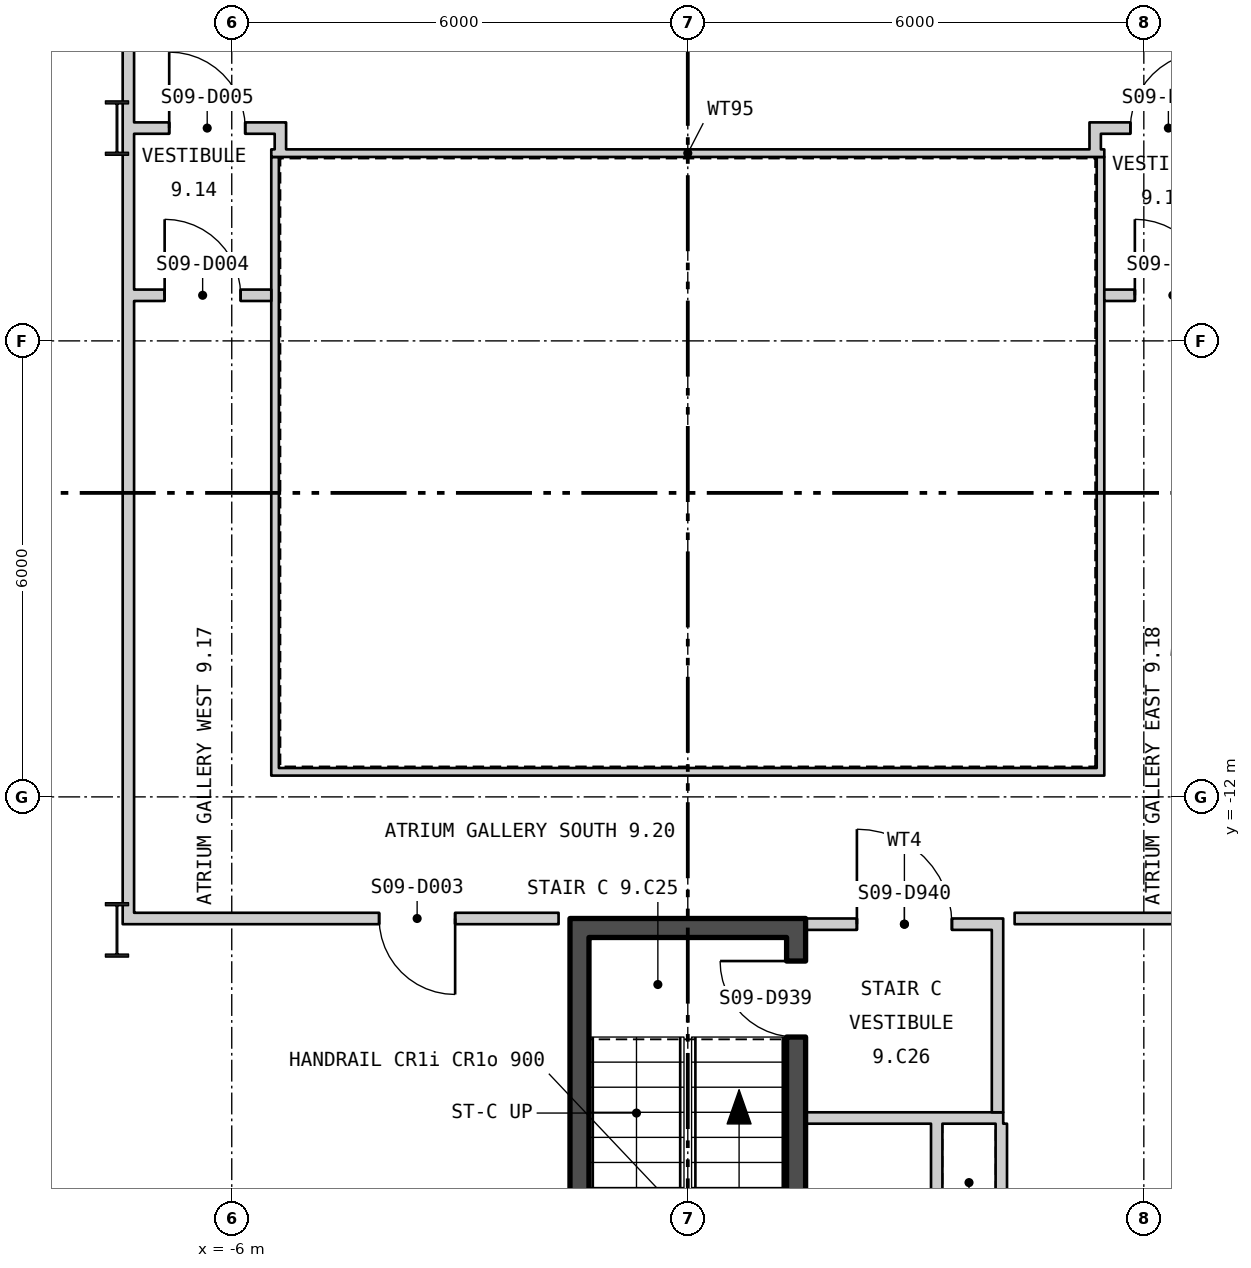
"""IFC4 building model, lengths in metres.
Left out: names, types, materials, properties, quantities, classifications, styles, units other than length and angle.
Written with IfcOpenShell. Run it as: python <this file> out.ifc"""

import sys

from ifc_helpers import new_model, si_unit, direction, frame, frame_2d, origin, origin_2d, place, context, subcontext, project, spatial, polyline, rectangle, i_section, outline, extrude, element, fill, save


model = new_model("IFC4")
c1 = context("Model", 3, precision=1e-05, world=origin(), true_north=direction((0.0, 1.0)))
c2 = subcontext(c1, "Body", "Model", "MODEL_VIEW")
j1 = project(units=[si_unit("LENGTHUNIT", "METRE"), si_unit("PLANEANGLEUNIT", "RADIAN")], contexts=[c1])
p1 = place(None, origin())
s1 = spatial("IfcSite", under=j1, at=p1, CompositionType="ELEMENT")
p2 = place(p1, origin())
s2 = spatial("IfcBuilding", under=s1, at=p2, CompositionType="ELEMENT")
p3 = place(p2, frame((0.0, 0.0, 124.8)))
s3 = spatial("IfcBuildingStorey", under=s2, at=p3, CompositionType="ELEMENT", Elevation=124.8)
for number, where, z_axis, x_axis in (
    (1, (-7.51, -3.2, 0.0), (0.0, 0.0, 1.0), (1.0, 0.0, 0.0)),
    (2, (-7.51, -13.75, 0.0), (0.0, 0.0, 1.0), (1.0, 0.0, 0.0)),
):
    element("IfcColumn", number, at=place(p3, frame(where, z_axis=z_axis, x_axis=x_axis)), inside=s3, PredefinedType="COLUMN", context=c2, shape_type="SweptSolid", body=[
        extrude(i_section(OverallWidth=0.304, OverallDepth=0.716, WebThickness=0.021, FlangeThickness=0.04, at=origin_2d()), origin(), (0.0, 0.0, 1.0), 4.5),
    ])
p4 = place(p3, frame((-27.45, 12.042, -0.18), z_axis=(0.0, 0.0, 1.0), x_axis=(0.500000711659, -0.866024992908, 0.0)))
e3 = element("IfcWall", 3, at=p4, inside=s3, PredefinedType="SOLIDWALL", context=c2, shape_type="SweptSolid", body=[
    extrude(outline(polyline([(-0.13, -0.225), (45.87, -0.225), (45.61, 0.225), (0.13, 0.225), (-0.13, -0.225)])), origin(), (0.0, 0.0, 1.0), 4.28),
])
p5 = place(p4, frame((1.424, 0.0, 1.08)))
e4 = element("IfcOpeningElement", 4, at=p5, cuts=e3, PredefinedType="OPENING", context=c2, shape_type="SweptSolid", body=[
    extrude(rectangle(XDim=2.4, YDim=2.6, at=frame_2d((1.2, 1.3))), frame((0.0, 0.235, 0.0), z_axis=(0.0, -1.0, 0.0), x_axis=(1.0, 0.0, 0.0)), (0.0, 0.0, 1.0), 0.47),
])
p6 = place(p4, frame((5.893, 0.0, 1.08)))
e5 = element("IfcOpeningElement", 5, at=p6, cuts=e3, PredefinedType="OPENING", context=c2, shape_type="SweptSolid", body=[
    extrude(rectangle(XDim=2.4, YDim=2.6, at=frame_2d((1.2, 1.3))), frame((0.0, 0.235, 0.0), z_axis=(0.0, -1.0, 0.0), x_axis=(1.0, 0.0, 0.0)), (0.0, 0.0, 1.0), 0.47),
])
p7 = place(p4, frame((10.401, 0.0, 1.08)))
e6 = element("IfcOpeningElement", 6, at=p7, cuts=e3, PredefinedType="OPENING", context=c2, shape_type="SweptSolid", body=[
    extrude(rectangle(XDim=2.4, YDim=2.6, at=frame_2d((1.2, 1.3))), frame((0.0, 0.235, 0.0), z_axis=(0.0, -1.0, 0.0), x_axis=(1.0, 0.0, 0.0)), (0.0, 0.0, 1.0), 0.47),
])
p8 = place(p4, frame((19.416, 0.0, 1.08)))
e7 = element("IfcOpeningElement", 7, at=p8, cuts=e3, PredefinedType="OPENING", context=c2, shape_type="SweptSolid", body=[
    extrude(rectangle(XDim=2.4, YDim=2.6, at=frame_2d((1.2, 1.3))), frame((0.0, 0.235, 0.0), z_axis=(0.0, -1.0, 0.0), x_axis=(1.0, 0.0, 0.0)), (0.0, 0.0, 1.0), 0.47),
])
p9 = place(p4, frame((23.924, 0.0, 1.08)))
e8 = element("IfcOpeningElement", 8, at=p9, cuts=e3, PredefinedType="OPENING", context=c2, shape_type="SweptSolid", body=[
    extrude(rectangle(XDim=2.4, YDim=2.6, at=frame_2d((1.2, 1.3))), frame((0.0, 0.235, 0.0), z_axis=(0.0, -1.0, 0.0), x_axis=(1.0, 0.0, 0.0)), (0.0, 0.0, 1.0), 0.47),
])
p10 = place(p4, frame((28.431, 0.0, 1.08)))
e9 = element("IfcOpeningElement", 9, at=p10, cuts=e3, PredefinedType="OPENING", context=c2, shape_type="SweptSolid", body=[
    extrude(rectangle(XDim=2.4, YDim=2.6, at=frame_2d((1.2, 1.3))), frame((0.0, 0.235, 0.0), z_axis=(0.0, -1.0, 0.0), x_axis=(1.0, 0.0, 0.0)), (0.0, 0.0, 1.0), 0.47),
])
p11 = place(p4, frame((32.939, 0.0, 1.08)))
e10 = element("IfcOpeningElement", 10, at=p11, cuts=e3, PredefinedType="OPENING", context=c2, shape_type="SweptSolid", body=[
    extrude(rectangle(XDim=2.4, YDim=2.6, at=frame_2d((1.2, 1.3))), frame((0.0, 0.235, 0.0), z_axis=(0.0, -1.0, 0.0), x_axis=(1.0, 0.0, 0.0)), (0.0, 0.0, 1.0), 0.47),
])
p12 = place(p4, frame((37.447, 0.0, 1.08)))
e11 = element("IfcOpeningElement", 11, at=p12, cuts=e3, PredefinedType="OPENING", context=c2, shape_type="SweptSolid", body=[
    extrude(rectangle(XDim=2.4, YDim=2.6, at=frame_2d((1.2, 1.3))), frame((0.0, 0.235, 0.0), z_axis=(0.0, -1.0, 0.0), x_axis=(1.0, 0.0, 0.0)), (0.0, 0.0, 1.0), 0.47),
])
p13 = place(p4, frame((41.916, 0.0, 1.08)))
e12 = element("IfcOpeningElement", 12, at=p13, cuts=e3, PredefinedType="OPENING", context=c2, shape_type="SweptSolid", body=[
    extrude(rectangle(XDim=2.4, YDim=2.6, at=frame_2d((1.2, 1.3))), frame((0.0, 0.235, 0.0), z_axis=(0.0, -1.0, 0.0), x_axis=(1.0, 0.0, 0.0)), (0.0, 0.0, 1.0), 0.47),
])
p14 = place(p3, frame((4.58, -27.57, -0.18), z_axis=(0.0, 0.0, 1.0), x_axis=(0.500000711659, 0.866024992908, 0.0)))
e13 = element("IfcWall", 13, at=p14, inside=s3, PredefinedType="SOLIDWALL", context=c2, shape_type="SweptSolid", body=[
    extrude(outline(polyline([(-0.13, -0.225), (45.87, -0.225), (45.61, 0.225), (0.13, 0.225), (-0.13, -0.225)])), origin(), (0.0, 0.0, 1.0), 4.28),
])
p15 = place(p14, frame((1.424, 0.0, 1.08)))
e14 = element("IfcOpeningElement", 14, at=p15, cuts=e13, PredefinedType="OPENING", context=c2, shape_type="SweptSolid", body=[
    extrude(rectangle(XDim=2.4, YDim=2.6, at=frame_2d((1.2, 1.3))), frame((0.0, 0.235, 0.0), z_axis=(0.0, -1.0, 0.0), x_axis=(1.0, 0.0, 0.0)), (0.0, 0.0, 1.0), 0.47),
])
p16 = place(p14, frame((5.893, 0.0, 1.08)))
e15 = element("IfcOpeningElement", 15, at=p16, cuts=e13, PredefinedType="OPENING", context=c2, shape_type="SweptSolid", body=[
    extrude(rectangle(XDim=2.4, YDim=2.6, at=frame_2d((1.2, 1.3))), frame((0.0, 0.235, 0.0), z_axis=(0.0, -1.0, 0.0), x_axis=(1.0, 0.0, 0.0)), (0.0, 0.0, 1.0), 0.47),
])
p17 = place(p14, frame((10.401, 0.0, 1.08)))
e16 = element("IfcOpeningElement", 16, at=p17, cuts=e13, PredefinedType="OPENING", context=c2, shape_type="SweptSolid", body=[
    extrude(rectangle(XDim=2.4, YDim=2.6, at=frame_2d((1.2, 1.3))), frame((0.0, 0.235, 0.0), z_axis=(0.0, -1.0, 0.0), x_axis=(1.0, 0.0, 0.0)), (0.0, 0.0, 1.0), 0.47),
])
p18 = place(p14, frame((14.909, 0.0, 1.08)))
e17 = element("IfcOpeningElement", 17, at=p18, cuts=e13, PredefinedType="OPENING", context=c2, shape_type="SweptSolid", body=[
    extrude(rectangle(XDim=2.4, YDim=2.6, at=frame_2d((1.2, 1.3))), frame((0.0, 0.235, 0.0), z_axis=(0.0, -1.0, 0.0), x_axis=(1.0, 0.0, 0.0)), (0.0, 0.0, 1.0), 0.47),
])
p19 = place(p14, frame((19.416, 0.0, 1.08)))
e18 = element("IfcOpeningElement", 18, at=p19, cuts=e13, PredefinedType="OPENING", context=c2, shape_type="SweptSolid", body=[
    extrude(rectangle(XDim=2.4, YDim=2.6, at=frame_2d((1.2, 1.3))), frame((0.0, 0.235, 0.0), z_axis=(0.0, -1.0, 0.0), x_axis=(1.0, 0.0, 0.0)), (0.0, 0.0, 1.0), 0.47),
])
p20 = place(p14, frame((23.924, 0.0, 1.08)))
e19 = element("IfcOpeningElement", 19, at=p20, cuts=e13, PredefinedType="OPENING", context=c2, shape_type="SweptSolid", body=[
    extrude(rectangle(XDim=2.4, YDim=2.6, at=frame_2d((1.2, 1.3))), frame((0.0, 0.235, 0.0), z_axis=(0.0, -1.0, 0.0), x_axis=(1.0, 0.0, 0.0)), (0.0, 0.0, 1.0), 0.47),
])
p21 = place(p14, frame((32.939, 0.0, 1.08)))
e20 = element("IfcOpeningElement", 20, at=p21, cuts=e13, PredefinedType="OPENING", context=c2, shape_type="SweptSolid", body=[
    extrude(rectangle(XDim=2.4, YDim=2.6, at=frame_2d((1.2, 1.3))), frame((0.0, 0.235, 0.0), z_axis=(0.0, -1.0, 0.0), x_axis=(1.0, 0.0, 0.0)), (0.0, 0.0, 1.0), 0.47),
])
p22 = place(p14, frame((37.447, 0.0, 1.08)))
e21 = element("IfcOpeningElement", 21, at=p22, cuts=e13, PredefinedType="OPENING", context=c2, shape_type="SweptSolid", body=[
    extrude(rectangle(XDim=2.4, YDim=2.6, at=frame_2d((1.2, 1.3))), frame((0.0, 0.235, 0.0), z_axis=(0.0, -1.0, 0.0), x_axis=(1.0, 0.0, 0.0)), (0.0, 0.0, 1.0), 0.47),
])
p23 = place(p14, frame((41.916, 0.0, 1.08)))
e22 = element("IfcOpeningElement", 22, at=p23, cuts=e13, PredefinedType="OPENING", context=c2, shape_type="SweptSolid", body=[
    extrude(rectangle(XDim=2.4, YDim=2.6, at=frame_2d((1.2, 1.3))), frame((0.0, 0.235, 0.0), z_axis=(0.0, -1.0, 0.0), x_axis=(1.0, 0.0, 0.0)), (0.0, 0.0, 1.0), 0.47),
])
p24 = place(p3, frame((-5.48, -11.67, 0.0), z_axis=(0.0, 0.0, 1.0), x_axis=(1.0, 0.0, 0.0)))
e23 = element("IfcWall", 23, at=p24, inside=s3, PredefinedType="PARTITIONING", context=c2, shape_type="SweptSolid", body=[
    extrude(rectangle(XDim=10.96, YDim=0.1, at=frame_2d((5.48, 0.0))), origin(), (0.0, 0.0, 1.0), 4.3),
])
p25 = place(p3, frame((5.43, -11.62, 0.0), z_axis=(0.0, 0.0, 1.0), x_axis=(0.0, 1.0, 0.0)))
e24 = element("IfcWall", 24, at=p25, inside=s3, PredefinedType="PARTITIONING", context=c2, shape_type="SweptSolid", body=[
    extrude(rectangle(XDim=8.04, YDim=0.1, at=frame_2d((4.02, 0.0))), origin(), (0.0, 0.0, 1.0), 4.3),
])
p26 = place(p3, frame((5.48, -3.53, 0.0), z_axis=(0.0, 0.0, 1.0), x_axis=(-1.0, 0.0, 0.0)))
e25 = element("IfcWall", 25, at=p26, inside=s3, PredefinedType="PARTITIONING", context=c2, shape_type="SweptSolid", body=[
    extrude(rectangle(XDim=10.96, YDim=0.1, at=frame_2d((5.48, 0.0))), origin(), (0.0, 0.0, 1.0), 4.3),
])
p27 = place(p3, frame((-5.43, -3.58, 0.0), z_axis=(0.0, 0.0, 1.0), x_axis=(0.0, -1.0, 0.0)))
e26 = element("IfcWall", 26, at=p27, inside=s3, PredefinedType="PARTITIONING", context=c2, shape_type="SweptSolid", body=[
    extrude(rectangle(XDim=8.04, YDim=0.1, at=frame_2d((4.02, 0.0))), origin(), (0.0, 0.0, 1.0), 4.3),
])
p28 = place(p3, frame((-1.425, -21.05, 0.0), z_axis=(0.0, 0.0, 1.0), x_axis=(0.0, 1.0, 0.0)))
e27 = element("IfcWall", 27, at=p28, inside=s3, PredefinedType="SHEAR", context=c2, shape_type="SweptSolid", body=[
    extrude(rectangle(XDim=7.2, YDim=0.25, at=frame_2d((3.6, 0.0))), origin(), (0.0, 0.0, 1.0), 4.3),
])
p29 = place(p3, frame((1.425, -21.05, 0.0), z_axis=(0.0, 0.0, 1.0), x_axis=(0.0, 1.0, 0.0)))
e28 = element("IfcWall", 28, at=p29, inside=s3, PredefinedType="SHEAR", context=c2, shape_type="SweptSolid", body=[
    extrude(rectangle(XDim=7.2, YDim=0.25, at=frame_2d((3.6, 0.0))), origin(), (0.0, 0.0, 1.0), 4.3),
])
p30 = place(p29, frame((5.89, 0.0, 0.0)))
e29 = element("IfcOpeningElement", 29, at=p30, cuts=e28, PredefinedType="OPENING", context=c2, shape_type="SweptSolid", body=[
    extrude(rectangle(XDim=1.0, YDim=2.1, at=frame_2d((0.5, 1.05))), frame((0.0, 0.135, 0.0), z_axis=(0.0, -1.0, 0.0), x_axis=(1.0, 0.0, 0.0)), (0.0, 0.0, 1.0), 0.27),
])
p31 = place(p3, frame((-1.55, -13.725, 0.0), z_axis=(0.0, 0.0, 1.0), x_axis=(1.0, 0.0, 0.0)))
e30 = element("IfcWall", 30, at=p31, inside=s3, PredefinedType="SHEAR", context=c2, shape_type="SweptSolid", body=[
    extrude(rectangle(XDim=3.1, YDim=0.25, at=frame_2d((1.55, 0.0))), origin(), (0.0, 0.0, 1.0), 4.3),
])
p32 = place(p3, frame((1.55, -16.225, 0.0), z_axis=(0.0, 0.0, 1.0), x_axis=(1.0, 0.0, 0.0)))
e31 = element("IfcWall", 31, at=p32, inside=s3, PredefinedType="PARTITIONING", context=c2, shape_type="SweptSolid", body=[
    extrude(rectangle(XDim=2.6, YDim=0.15, at=frame_2d((1.3, 0.0))), origin(), (0.0, 0.0, 1.0), 4.3),
])
p33 = place(p3, frame((4.075, -16.15, 0.0), z_axis=(0.0, 0.0, 1.0), x_axis=(0.0, 1.0, 0.0)))
e32 = element("IfcWall", 32, at=p33, inside=s3, PredefinedType="PARTITIONING", context=c2, shape_type="SweptSolid", body=[
    extrude(rectangle(XDim=2.4, YDim=0.15, at=frame_2d((1.2, 0.0))), origin(), (0.0, 0.0, 1.0), 4.3),
])
p34 = place(p3, frame((1.55, -13.675, 0.0), z_axis=(0.0, 0.0, 1.0), x_axis=(1.0, 0.0, 0.0)))
e33 = element("IfcWall", 33, at=p34, inside=s3, PredefinedType="PARTITIONING", context=c2, shape_type="SweptSolid", body=[
    extrude(rectangle(XDim=2.6, YDim=0.15, at=frame_2d((1.3, 0.0))), origin(), (0.0, 0.0, 1.0), 3.39),
])
p35 = place(p34, frame((0.675, 0.0, 0.0)))
e34 = element("IfcOpeningElement", 34, at=p35, cuts=e33, PredefinedType="OPENING", context=c2, shape_type="SweptSolid", body=[
    extrude(rectangle(XDim=1.25, YDim=2.1, at=frame_2d((0.625, 1.05))), frame((0.0, 0.085, 0.0), z_axis=(0.0, -1.0, 0.0), x_axis=(1.0, 0.0, 0.0)), (0.0, 0.0, 1.0), 0.17),
])
p36 = place(p3, frame((3.275, -18.0, 0.0), z_axis=(0.0, 0.0, 1.0), x_axis=(0.0, 1.0, 0.0)))
e35 = element("IfcWall", 35, at=p36, inside=s3, PredefinedType="PARTITIONING", context=c2, shape_type="SweptSolid", body=[
    extrude(rectangle(XDim=1.7, YDim=0.15, at=frame_2d((0.85, 0.0))), origin(), (0.0, 0.0, 1.0), 3.61),
])
p37 = place(p3, frame((4.125, -18.0, 0.0), z_axis=(0.0, 0.0, 1.0), x_axis=(0.0, 1.0, 0.0)))
e36 = element("IfcWall", 36, at=p37, inside=s3, PredefinedType="PARTITIONING", context=c2, shape_type="SweptSolid", body=[
    extrude(rectangle(XDim=1.7, YDim=0.15, at=frame_2d((0.85, 0.0))), origin(), (0.0, 0.0, 1.0), 4.3),
])
p38 = place(p3, frame((-7.36, -13.675, 0.0), z_axis=(0.0, 0.0, 1.0), x_axis=(0.0, 1.0, 0.0)))
e37 = element("IfcWall", 37, at=p38, inside=s3, PredefinedType="PARTITIONING", context=c2, shape_type="SweptSolid", body=[
    extrude(rectangle(XDim=10.167, YDim=0.15, at=frame_2d((5.083, 0.0))), origin(), (0.0, 0.0, 1.0), 3.7),
])
p39 = place(p3, frame((-7.36, -3.508, 0.0), z_axis=(0.0, 0.0, 1.0), x_axis=(0.0, 1.0, 0.0)))
e38 = element("IfcWall", 38, at=p39, inside=s3, PredefinedType="PARTITIONING", context=c2, shape_type="SweptSolid", body=[
    extrude(rectangle(XDim=1.633, YDim=0.15, at=frame_2d((0.817, 0.0))), origin(), (0.0, 0.0, 1.0), 4.3),
])
p40 = place(p3, frame((-7.285, -13.6, 0.0), z_axis=(0.0, 0.0, 1.0), x_axis=(1.0, 0.0, 0.0)))
e39 = element("IfcWall", 39, at=p40, inside=s3, PredefinedType="PARTITIONING", context=c2, shape_type="SweptSolid", body=[
    extrude(rectangle(XDim=5.585, YDim=0.15, at=frame_2d((2.792, 0.0))), origin(), (0.0, 0.0, 1.0), 3.39),
])
p41 = place(p40, frame((3.224, 0.0, 0.0)))
e40 = element("IfcOpeningElement", 40, at=p41, cuts=e39, PredefinedType="OPENING", context=c2, shape_type="SweptSolid", body=[
    extrude(rectangle(XDim=1.0, YDim=2.1, at=frame_2d((0.5, 1.05))), frame((0.0, 0.085, 0.0), z_axis=(0.0, -1.0, 0.0), x_axis=(1.0, 0.0, 0.0)), (0.0, 0.0, 1.0), 0.17),
])
p42 = place(p3, frame((-7.285, -5.4, 0.0), z_axis=(0.0, 0.0, 1.0), x_axis=(1.0, 0.0, 0.0)))
e41 = element("IfcWall", 41, at=p42, inside=s3, PredefinedType="PARTITIONING", context=c2, shape_type="SweptSolid", body=[
    extrude(rectangle(XDim=1.805, YDim=0.15, at=frame_2d((0.902, 0.0))), origin(), (0.0, 0.0, 1.0), 4.3),
])
p43 = place(p42, frame((0.402, 0.0, 0.0)))
e42 = element("IfcOpeningElement", 42, at=p43, cuts=e41, PredefinedType="OPENING", context=c2, shape_type="SweptSolid", body=[
    extrude(rectangle(XDim=1.0, YDim=2.1, at=frame_2d((0.5, 1.05))), frame((0.0, 0.085, 0.0), z_axis=(0.0, -1.0, 0.0), x_axis=(1.0, 0.0, 0.0)), (0.0, 0.0, 1.0), 0.17),
])
p44 = place(p3, frame((-7.285, -3.2, 0.0), z_axis=(0.0, 0.0, 1.0), x_axis=(1.0, 0.0, 0.0)))
e43 = element("IfcWall", 43, at=p44, inside=s3, PredefinedType="PARTITIONING", context=c2, shape_type="SweptSolid", body=[
    extrude(rectangle(XDim=2.0, YDim=0.15, at=frame_2d((1.0, 0.0))), origin(), (0.0, 0.0, 1.0), 3.39),
])
p45 = place(p44, frame((0.462, 0.0, 0.0)))
e44 = element("IfcOpeningElement", 44, at=p45, cuts=e43, PredefinedType="OPENING", context=c2, shape_type="SweptSolid", body=[
    extrude(rectangle(XDim=1.0, YDim=2.1, at=frame_2d((0.5, 1.05))), frame((0.0, 0.085, 0.0), z_axis=(0.0, -1.0, 0.0), x_axis=(1.0, 0.0, 0.0)), (0.0, 0.0, 1.0), 0.17),
])
p46 = place(p3, frame((-5.36, -3.48, 0.0), z_axis=(0.0, 0.0, 1.0), x_axis=(0.0, 1.0, 0.0)))
e45 = element("IfcWall", 45, at=p46, inside=s3, PredefinedType="PARTITIONING", context=c2, shape_type="SweptSolid", body=[
    extrude(rectangle(XDim=0.205, YDim=0.15, at=frame_2d((0.102, 0.0))), origin(), (0.0, 0.0, 1.0), 4.3),
])
p47 = place(p3, frame((4.3, -13.6, 0.0), z_axis=(0.0, 0.0, 1.0), x_axis=(1.0, 0.0, 0.0)))
e46 = element("IfcWall", 46, at=p47, inside=s3, PredefinedType="PARTITIONING", context=c2, shape_type="SweptSolid", body=[
    extrude(rectangle(XDim=2.985, YDim=0.15, at=frame_2d((1.492, 0.0))), origin(), (0.0, 0.0, 1.0), 3.39),
])
p48 = place(p3, frame((5.285, -3.2, 0.0), z_axis=(0.0, 0.0, 1.0), x_axis=(1.0, 0.0, 0.0)))
e47 = element("IfcWall", 47, at=p48, inside=s3, PredefinedType="PARTITIONING", context=c2, shape_type="SweptSolid", body=[
    extrude(rectangle(XDim=2.0, YDim=0.15, at=frame_2d((1.0, 0.0))), origin(), (0.0, 0.0, 1.0), 3.39),
])
p49 = place(p48, frame((0.538, 0.0, 0.0)))
e48 = element("IfcOpeningElement", 48, at=p49, cuts=e47, PredefinedType="OPENING", context=c2, shape_type="SweptSolid", body=[
    extrude(rectangle(XDim=1.0, YDim=2.1, at=frame_2d((0.5, 1.05))), frame((0.0, 0.085, 0.0), z_axis=(0.0, -1.0, 0.0), x_axis=(1.0, 0.0, 0.0)), (0.0, 0.0, 1.0), 0.17),
])
p50 = place(p3, frame((5.36, -3.48, 0.0), z_axis=(0.0, 0.0, 1.0), x_axis=(0.0, 1.0, 0.0)))
e49 = element("IfcWall", 49, at=p50, inside=s3, PredefinedType="PARTITIONING", context=c2, shape_type="SweptSolid", body=[
    extrude(rectangle(XDim=0.205, YDim=0.15, at=frame_2d((0.102, 0.0))), origin(), (0.0, 0.0, 1.0), 4.3),
])
p51 = place(p3, frame((5.48, -5.4, 0.0), z_axis=(0.0, 0.0, 1.0), x_axis=(1.0, 0.0, 0.0)))
e50 = element("IfcWall", 50, at=p51, inside=s3, PredefinedType="PARTITIONING", context=c2, shape_type="SweptSolid", body=[
    extrude(rectangle(XDim=1.805, YDim=0.15, at=frame_2d((0.902, 0.0))), origin(), (0.0, 0.0, 1.0), 4.3),
])
p52 = place(p51, frame((0.402, 0.0, 0.0)))
e51 = element("IfcOpeningElement", 51, at=p52, cuts=e50, PredefinedType="OPENING", context=c2, shape_type="SweptSolid", body=[
    extrude(rectangle(XDim=1.0, YDim=2.1, at=frame_2d((0.5, 1.05))), frame((0.0, 0.085, 0.0), z_axis=(0.0, -1.0, 0.0), x_axis=(1.0, 0.0, 0.0)), (0.0, 0.0, 1.0), 0.17),
])
p53 = place(p30, origin())
e52 = element("IfcDoor", 52, at=p53, inside=s3, OperationType="SINGLE_SWING_LEFT", PredefinedType="DOOR", context=c2, shape_type="SweptSolid", body=[
    extrude(rectangle(XDim=1.0, YDim=2.1, at=frame_2d((0.5, 1.05))), frame((0.0, 0.025, 0.0), z_axis=(0.0, -1.0, 0.0), x_axis=(1.0, 0.0, 0.0)), (0.0, 0.0, 1.0), 0.05),
])
fill(e29, e52)
p54 = place(p35, origin())
e53 = element("IfcDoor", 53, at=p54, inside=s3, OperationType="SINGLE_SWING_RIGHT", PredefinedType="DOOR", context=c2, shape_type="SweptSolid", body=[
    extrude(rectangle(XDim=1.25, YDim=2.1, at=frame_2d((0.625, 1.05))), frame((0.0, 0.025, 0.0), z_axis=(0.0, -1.0, 0.0), x_axis=(1.0, 0.0, 0.0)), (0.0, 0.0, 1.0), 0.05),
])
fill(e34, e53)
p55 = place(p41, origin())
e54 = element("IfcDoor", 54, at=p55, inside=s3, OperationType="SINGLE_SWING_RIGHT", PredefinedType="DOOR", context=c2, shape_type="SweptSolid", body=[
    extrude(rectangle(XDim=1.0, YDim=2.1, at=frame_2d((0.5, 1.05))), frame((0.0, 0.025, 0.0), z_axis=(0.0, -1.0, 0.0), x_axis=(1.0, 0.0, 0.0)), (0.0, 0.0, 1.0), 0.05),
])
fill(e40, e54)
p56 = place(p43, origin())
e55 = element("IfcDoor", 55, at=p56, inside=s3, OperationType="SINGLE_SWING_RIGHT", PredefinedType="DOOR", context=c2, shape_type="SweptSolid", body=[
    extrude(rectangle(XDim=1.0, YDim=2.1, at=frame_2d((0.5, 1.05))), frame((0.0, 0.025, 0.0), z_axis=(0.0, -1.0, 0.0), x_axis=(1.0, 0.0, 0.0)), (0.0, 0.0, 1.0), 0.05),
])
fill(e42, e55)
p57 = place(p45, origin())
e56 = element("IfcDoor", 56, at=p57, inside=s3, OperationType="SINGLE_SWING_RIGHT", PredefinedType="DOOR", context=c2, shape_type="SweptSolid", body=[
    extrude(rectangle(XDim=1.0, YDim=2.1, at=frame_2d((0.5, 1.05))), frame((0.0, 0.025, 0.0), z_axis=(0.0, -1.0, 0.0), x_axis=(1.0, 0.0, 0.0)), (0.0, 0.0, 1.0), 0.05),
])
fill(e44, e56)
p58 = place(p49, origin())
e57 = element("IfcDoor", 57, at=p58, inside=s3, OperationType="SINGLE_SWING_LEFT", PredefinedType="DOOR", context=c2, shape_type="SweptSolid", body=[
    extrude(rectangle(XDim=1.0, YDim=2.1, at=frame_2d((0.5, 1.05))), frame((0.0, 0.025, 0.0), z_axis=(0.0, -1.0, 0.0), x_axis=(1.0, 0.0, 0.0)), (0.0, 0.0, 1.0), 0.05),
])
fill(e48, e57)
p59 = place(p52, origin())
e58 = element("IfcDoor", 58, at=p59, inside=s3, OperationType="SINGLE_SWING_RIGHT", PredefinedType="DOOR", context=c2, shape_type="SweptSolid", body=[
    extrude(rectangle(XDim=1.0, YDim=2.1, at=frame_2d((0.5, 1.05))), frame((0.0, 0.025, 0.0), z_axis=(0.0, -1.0, 0.0), x_axis=(1.0, 0.0, 0.0)), (0.0, 0.0, 1.0), 0.05),
])
fill(e51, e58)
save(model, sys.argv[1])
